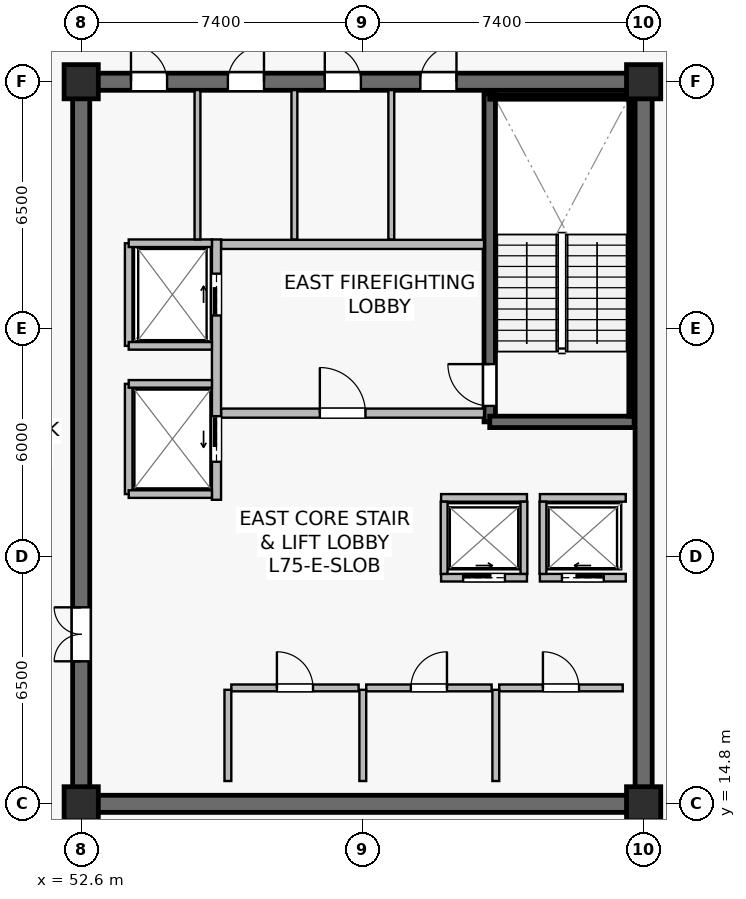
"""IFC4 building model, lengths in metres.
Left out: names, types, materials, properties, quantities, classifications, styles, units other than length and angle.
Written with IfcOpenShell. Run it as: python <this file> out.ifc"""

import sys

from ifc_helpers import new_model, si_unit, direction, frame, frame_2d, origin, origin_2d, place, context, subcontext, project, spatial, rectangle, extrude, source, transform, mapped, element, fill, save


model = new_model("IFC4")
c1 = context("Model", 3, precision=1e-05, world=origin(), true_north=direction((0.0, 1.0)))
c2 = subcontext(c1, "Body", "Model", "MODEL_VIEW")
j1 = project(units=[si_unit("LENGTHUNIT", "METRE"), si_unit("PLANEANGLEUNIT", "RADIAN")], contexts=[c1])
p1 = place(None, origin())
s1 = spatial("IfcSite", under=j1, at=p1, CompositionType="ELEMENT")
p2 = place(p1, origin())
s2 = spatial("IfcBuilding", under=s1, at=p2, CompositionType="ELEMENT")
p3 = place(p2, frame((0.0, 0.0, 314.4)))
s3 = spatial("IfcBuildingStorey", under=s2, at=p3, CompositionType="ELEMENT", Elevation=314.4)
p4 = place(p3, frame((52.375, 14.8, 0.0), z_axis=(0.0, 0.0, 1.0), x_axis=(1.0, 0.0, 0.0)))
e1 = element("IfcWall", 1, at=p4, inside=s3, PredefinedType="SHEAR", context=c2, shape_type="SweptSolid", body=[
    extrude(rectangle(XDim=15.25, YDim=0.45, at=frame_2d((7.625, 0.0))), origin(), (0.0, 0.0, 1.0), 3.9),
])
p5 = place(p3, frame((52.375, 33.8, 0.0), z_axis=(0.0, 0.0, 1.0), x_axis=(1.0, 0.0, 0.0)))
e2 = element("IfcWall", 2, at=p5, inside=s3, PredefinedType="SHEAR", context=c2, shape_type="SweptSolid", body=[
    extrude(rectangle(XDim=15.25, YDim=0.45, at=frame_2d((7.625, 0.0))), origin(), (0.0, 0.0, 1.0), 3.9),
])
p6 = place(p5, frame((9.15, 0.0, 0.0)))
e3 = element("IfcOpeningElement", 3, at=p6, cuts=e2, PredefinedType="OPENING", context=c2, shape_type="SweptSolid", body=[
    extrude(rectangle(XDim=0.95, YDim=2.15, at=frame_2d((0.475, 1.075))), frame((0.0, 0.235, 0.0), z_axis=(0.0, -1.0, 0.0), x_axis=(1.0, 0.0, 0.0)), (0.0, 0.0, 1.0), 0.47),
])
p7 = place(p5, frame((6.635, 0.0, 0.0)))
e4 = element("IfcOpeningElement", 4, at=p7, cuts=e2, PredefinedType="OPENING", context=c2, shape_type="SweptSolid", body=[
    extrude(rectangle(XDim=0.95, YDim=2.15, at=frame_2d((0.475, 1.075))), frame((0.0, 0.235, 0.0), z_axis=(0.0, -1.0, 0.0), x_axis=(1.0, 0.0, 0.0)), (0.0, 0.0, 1.0), 0.47),
])
p8 = place(p5, frame((4.085, 0.0, 0.0)))
e5 = element("IfcOpeningElement", 5, at=p8, cuts=e2, PredefinedType="OPENING", context=c2, shape_type="SweptSolid", body=[
    extrude(rectangle(XDim=0.95, YDim=2.15, at=frame_2d((0.475, 1.075))), frame((0.0, 0.235, 0.0), z_axis=(0.0, -1.0, 0.0), x_axis=(1.0, 0.0, 0.0)), (0.0, 0.0, 1.0), 0.47),
])
p9 = place(p5, frame((1.535, 0.0, 0.0)))
e6 = element("IfcOpeningElement", 6, at=p9, cuts=e2, PredefinedType="OPENING", context=c2, shape_type="SweptSolid", body=[
    extrude(rectangle(XDim=0.95, YDim=2.15, at=frame_2d((0.475, 1.075))), frame((0.0, 0.235, 0.0), z_axis=(0.0, -1.0, 0.0), x_axis=(1.0, 0.0, 0.0)), (0.0, 0.0, 1.0), 0.47),
])
p10 = place(p3, frame((52.6, 15.025, 0.0), z_axis=(0.0, 0.0, 1.0), x_axis=(0.0, 1.0, 0.0)))
e7 = element("IfcWall", 7, at=p10, inside=s3, PredefinedType="SHEAR", context=c2, shape_type="SweptSolid", body=[
    extrude(rectangle(XDim=18.55, YDim=0.45, at=frame_2d((9.275, 0.0))), origin(), (0.0, 0.0, 1.0), 3.9),
])
p11 = place(p10, frame((3.525, 0.0, 0.0)))
e8 = element("IfcOpeningElement", 8, at=p11, cuts=e7, PredefinedType="OPENING", context=c2, shape_type="SweptSolid", body=[
    extrude(rectangle(XDim=1.42, YDim=2.2, at=frame_2d((0.71, 1.1))), frame((0.0, 0.235, 0.0), z_axis=(0.0, -1.0, 0.0), x_axis=(1.0, 0.0, 0.0)), (0.0, 0.0, 1.0), 0.47),
])
p12 = place(p3, frame((67.4, 15.025, 0.0), z_axis=(0.0, 0.0, 1.0), x_axis=(0.0, 1.0, 0.0)))
e9 = element("IfcWall", 9, at=p12, inside=s3, PredefinedType="SHEAR", context=c2, shape_type="SweptSolid", body=[
    extrude(rectangle(XDim=18.55, YDim=0.45, at=frame_2d((9.275, 0.0))), origin(), (0.0, 0.0, 1.0), 3.9),
])
p13 = place(p3, frame((63.35, 24.85, 0.0), z_axis=(0.0, 0.0, 1.0), x_axis=(0.0, 1.0, 0.0)))
e10 = element("IfcWall", 10, at=p13, inside=s3, PredefinedType="SHEAR", context=c2, shape_type="SweptSolid", body=[
    extrude(rectangle(XDim=8.63, YDim=0.3, at=frame_2d((4.315, 0.0))), origin(), (0.0, 0.0, 1.0), 3.9),
])
p14 = place(p13, frame((0.42, 0.0, 0.0)))
e11 = element("IfcOpeningElement", 11, at=p14, cuts=e10, PredefinedType="OPENING", context=c2, shape_type="SweptSolid", body=[
    extrude(rectangle(XDim=1.1, YDim=2.15, at=frame_2d((0.55, 1.075))), frame((0.0, 0.16, 0.0), z_axis=(0.0, -1.0, 0.0), x_axis=(1.0, 0.0, 0.0)), (0.0, 0.0, 1.0), 0.32),
])
p15 = place(p3, frame((63.35, 24.85, 0.0), z_axis=(0.0, 0.0, 1.0), x_axis=(1.0, 0.0, 0.0)))
e12 = element("IfcWall", 12, at=p15, inside=s3, PredefinedType="SHEAR", context=c2, shape_type="SweptSolid", body=[
    extrude(rectangle(XDim=3.8, YDim=0.3, at=frame_2d((1.9, 0.0))), origin(), (0.0, 0.0, 1.0), 3.9),
])
p16 = place(p3, frame((63.35, 33.4, 0.0), z_axis=(0.0, 0.0, 1.0), x_axis=(1.0, 0.0, 0.0)))
e13 = element("IfcWall", 13, at=p16, inside=s3, PredefinedType="SOLIDWALL", context=c2, shape_type="SweptSolid", body=[
    extrude(rectangle(XDim=3.72, YDim=0.12, at=frame_2d((1.86, 0.0))), origin(), (0.0, 0.0, 1.0), 3.9),
])
p17 = place(p3, frame((67.07, 25.0, 0.0), z_axis=(0.0, 0.0, 1.0), x_axis=(0.0, 1.0, 0.0)))
e14 = element("IfcWall", 14, at=p17, inside=s3, PredefinedType="SOLIDWALL", context=c2, shape_type="SweptSolid", body=[
    extrude(rectangle(XDim=8.32, YDim=0.12, at=frame_2d((4.16, 0.0))), origin(), (0.0, 0.0, 1.0), 3.9),
])
m1 = source(origin(), c2, "Body", "SweptSolid", [
    extrude(rectangle(XDim=0.9, YDim=0.9, at=origin_2d()), origin(), (0.0, 0.0, 1.0), 4.2),
])
for number, where, z_axis, x_axis in (
    (15, (52.6, 14.8, 0.0), (0.0, 0.0, 1.0), (1.0, 0.0, 0.0)),
    (16, (67.4, 14.8, 0.0), (0.0, 0.0, 1.0), (1.0, 0.0, 0.0)),
    (17, (52.6, 33.8, 0.0), (0.0, 0.0, 1.0), (1.0, 0.0, 0.0)),
    (18, (67.4, 33.8, 0.0), (0.0, 0.0, 1.0), (1.0, 0.0, 0.0)),
):
    element("IfcColumn", number, at=place(p3, frame(where, z_axis=z_axis, x_axis=x_axis)), inside=s3, PredefinedType="COLUMN", context=c2, shape_type="MappedRepresentation", body=[
        mapped(m1, transform((0.0, 0.0, 0.0), scale=1.0)),
    ])
p18 = place(p3, frame((56.28, 25.08, 0.0), z_axis=(0.0, 0.0, 1.0), x_axis=(1.0, 0.0, 0.0)))
e19 = element("IfcWall", 19, at=p18, inside=s3, PredefinedType="SOLIDWALL", context=c2, shape_type="SweptSolid", body=[
    extrude(rectangle(XDim=6.92, YDim=0.24, at=frame_2d((3.46, 0.0))), origin(), (0.0, 0.0, 1.0), 3.297),
])
p19 = place(p18, frame((2.6, 0.0, 0.0)))
e20 = element("IfcOpeningElement", 20, at=p19, cuts=e19, PredefinedType="OPENING", context=c2, shape_type="SweptSolid", body=[
    extrude(rectangle(XDim=1.2, YDim=2.16, at=frame_2d((0.6, 1.08))), frame((0.0, 0.13, 0.0), z_axis=(0.0, -1.0, 0.0), x_axis=(1.0, 0.0, 0.0)), (0.0, 0.0, 1.0), 0.26),
])
p20 = place(p3, frame((56.28, 29.52, 0.0), z_axis=(0.0, 0.0, 1.0), x_axis=(1.0, 0.0, 0.0)))
e21 = element("IfcWall", 21, at=p20, inside=s3, PredefinedType="SOLIDWALL", context=c2, shape_type="SweptSolid", body=[
    extrude(rectangle(XDim=6.92, YDim=0.24, at=frame_2d((3.46, 0.0))), origin(), (0.0, 0.0, 1.0), 3.297),
])
p21 = place(p3, frame((56.16, 22.8, 0.0), z_axis=(0.0, 0.0, 1.0), x_axis=(0.0, 1.0, 0.0)))
e22 = element("IfcWall", 22, at=p21, inside=s3, PredefinedType="SOLIDWALL", context=c2, shape_type="SweptSolid", body=[
    extrude(rectangle(XDim=6.85, YDim=0.24, at=frame_2d((3.425, 0.0))), origin(), (0.0, 0.0, 1.0), 3.035),
])
p22 = place(p21, frame((4.85, 0.0, 0.0)))
e23 = element("IfcOpeningElement", 23, at=p22, cuts=e22, PredefinedType="OPENING", context=c2, shape_type="SweptSolid", body=[
    extrude(rectangle(XDim=1.1, YDim=2.22, at=frame_2d((0.55, 1.11))), frame((0.0, 0.13, 0.0), z_axis=(0.0, -1.0, 0.0), x_axis=(1.0, 0.0, 0.0)), (0.0, 0.0, 1.0), 0.26),
])
p23 = place(p21, frame((1.0, 0.0, 0.0)))
e24 = element("IfcOpeningElement", 24, at=p23, cuts=e22, PredefinedType="OPENING", context=c2, shape_type="SweptSolid", body=[
    extrude(rectangle(XDim=1.2, YDim=2.22, at=frame_2d((0.6, 1.11))), frame((0.0, 0.13, 0.0), z_axis=(0.0, -1.0, 0.0), x_axis=(1.0, 0.0, 0.0)), (0.0, 0.0, 1.0), 0.26),
])
p24 = place(p3, frame((64.67, 20.75, 0.0), z_axis=(0.0, 0.0, 1.0), x_axis=(1.0, 0.0, 0.0)))
e25 = element("IfcWall", 25, at=p24, inside=s3, PredefinedType="SOLIDWALL", context=c2, shape_type="SweptSolid", body=[
    extrude(rectangle(XDim=2.26, YDim=0.2, at=frame_2d((1.13, 0.0))), origin(), (0.0, 0.0, 1.0), 3.9),
])
p25 = place(p24, frame((0.58, 0.0, 0.0)))
e26 = element("IfcOpeningElement", 26, at=p25, cuts=e25, PredefinedType="OPENING", context=c2, shape_type="SweptSolid", body=[
    extrude(rectangle(XDim=1.1, YDim=2.22, at=frame_2d((0.55, 1.11))), frame((0.0, 0.11, 0.0), z_axis=(0.0, -1.0, 0.0), x_axis=(1.0, 0.0, 0.0)), (0.0, 0.0, 1.0), 0.22),
])
p26 = place(p3, frame((64.67, 22.85, 0.0), z_axis=(0.0, 0.0, 1.0), x_axis=(1.0, 0.0, 0.0)))
e27 = element("IfcWall", 27, at=p26, inside=s3, PredefinedType="SOLIDWALL", context=c2, shape_type="SweptSolid", body=[
    extrude(rectangle(XDim=2.26, YDim=0.2, at=frame_2d((1.13, 0.0))), origin(), (0.0, 0.0, 1.0), 3.9),
])
p27 = place(p3, frame((64.75, 20.85, 0.0), z_axis=(0.0, 0.0, 1.0), x_axis=(0.0, 1.0, 0.0)))
e28 = element("IfcWall", 28, at=p27, inside=s3, PredefinedType="SOLIDWALL", context=c2, shape_type="SweptSolid", body=[
    extrude(rectangle(XDim=1.9, YDim=0.18, at=frame_2d((0.95, 0.0))), origin(), (0.0, 0.0, 1.0), 3.9),
])
p28 = place(p3, frame((62.07, 20.75, 0.0), z_axis=(0.0, 0.0, 1.0), x_axis=(1.0, 0.0, 0.0)))
e29 = element("IfcWall", 29, at=p28, inside=s3, PredefinedType="SOLIDWALL", context=c2, shape_type="SweptSolid", body=[
    extrude(rectangle(XDim=2.26, YDim=0.2, at=frame_2d((1.13, 0.0))), origin(), (0.0, 0.0, 1.0), 3.9),
])
p29 = place(p28, frame((0.58, 0.0, 0.0)))
e30 = element("IfcOpeningElement", 30, at=p29, cuts=e29, PredefinedType="OPENING", context=c2, shape_type="SweptSolid", body=[
    extrude(rectangle(XDim=1.1, YDim=2.22, at=frame_2d((0.55, 1.11))), frame((0.0, 0.11, 0.0), z_axis=(0.0, -1.0, 0.0), x_axis=(1.0, 0.0, 0.0)), (0.0, 0.0, 1.0), 0.22),
])
p30 = place(p3, frame((62.07, 22.85, 0.0), z_axis=(0.0, 0.0, 1.0), x_axis=(1.0, 0.0, 0.0)))
e31 = element("IfcWall", 31, at=p30, inside=s3, PredefinedType="SOLIDWALL", context=c2, shape_type="SweptSolid", body=[
    extrude(rectangle(XDim=2.26, YDim=0.2, at=frame_2d((1.13, 0.0))), origin(), (0.0, 0.0, 1.0), 3.9),
])
for number, where, z_axis, x_axis in (
    (32, (62.15, 20.85, 0.0), (0.0, 0.0, 1.0), (0.0, 1.0, 0.0)),
    (33, (64.25, 20.85, 0.0), (0.0, 0.0, 1.0), (0.0, 1.0, 0.0)),
):
    element("IfcWall", number, at=place(p3, frame(where, z_axis=z_axis, x_axis=x_axis)), inside=s3, PredefinedType="SOLIDWALL", context=c2, shape_type="SweptSolid", body=[
        extrude(rectangle(XDim=1.9, YDim=0.18, at=frame_2d((0.95, 0.0))), origin(), (0.0, 0.0, 1.0), 3.9),
    ])
p31 = place(p3, frame((53.85, 26.85, 0.0), z_axis=(0.0, 0.0, 1.0), x_axis=(0.0, 1.0, 0.0)))
e34 = element("IfcWall", 34, at=p31, inside=s3, PredefinedType="SOLIDWALL", context=c2, shape_type="SweptSolid", body=[
    extrude(rectangle(XDim=2.7, YDim=0.2, at=frame_2d((1.35, 0.0))), origin(), (0.0, 0.0, 1.0), 3.9),
])
p32 = place(p3, frame((53.85, 29.55, 0.0), z_axis=(0.0, 0.0, 1.0), x_axis=(1.0, 0.0, 0.0)))
e35 = element("IfcWall", 35, at=p32, inside=s3, PredefinedType="SOLIDWALL", context=c2, shape_type="SweptSolid", body=[
    extrude(rectangle(XDim=2.19, YDim=0.2, at=frame_2d((1.095, 0.0))), origin(), (0.0, 0.0, 1.0), 3.9),
])
p33 = place(p3, frame((53.85, 26.85, 0.0), z_axis=(0.0, 0.0, 1.0), x_axis=(1.0, 0.0, 0.0)))
e36 = element("IfcWall", 36, at=p33, inside=s3, PredefinedType="SOLIDWALL", context=c2, shape_type="SweptSolid", body=[
    extrude(rectangle(XDim=2.19, YDim=0.2, at=frame_2d((1.095, 0.0))), origin(), (0.0, 0.0, 1.0), 3.297),
])
p34 = place(p3, frame((53.85, 22.95, 0.0), z_axis=(0.0, 0.0, 1.0), x_axis=(0.0, 1.0, 0.0)))
e37 = element("IfcWall", 37, at=p34, inside=s3, PredefinedType="SOLIDWALL", context=c2, shape_type="SweptSolid", body=[
    extrude(rectangle(XDim=2.9, YDim=0.2, at=frame_2d((1.45, 0.0))), origin(), (0.0, 0.0, 1.0), 3.035),
])
for number, where, z_axis, x_axis in (
    (38, (53.85, 25.85, 0.0), (0.0, 0.0, 1.0), (1.0, 0.0, 0.0)),
    (39, (53.85, 22.95, 0.0), (0.0, 0.0, 1.0), (1.0, 0.0, 0.0)),
):
    element("IfcWall", number, at=place(p3, frame(where, z_axis=z_axis, x_axis=x_axis)), inside=s3, PredefinedType="SOLIDWALL", context=c2, shape_type="SweptSolid", body=[
        extrude(rectangle(XDim=2.19, YDim=0.2, at=frame_2d((1.095, 0.0))), origin(), (0.0, 0.0, 1.0), 3.9),
    ])
p35 = place(p3, frame((63.6, 17.85, 0.0), z_axis=(0.0, 0.0, 1.0), x_axis=(1.0, 0.0, 0.0)))
e40 = element("IfcWall", 40, at=p35, inside=s3, PredefinedType="SOLIDWALL", context=c2, shape_type="SweptSolid", body=[
    extrude(rectangle(XDim=3.25, YDim=0.18, at=frame_2d((1.625, 0.0))), origin(), (0.0, 0.0, 1.0), 3.9),
])
p36 = place(p35, frame((1.15, 0.0, 0.0)))
e41 = element("IfcOpeningElement", 41, at=p36, cuts=e40, PredefinedType="OPENING", context=c2, shape_type="SweptSolid", body=[
    extrude(rectangle(XDim=0.95, YDim=2.15, at=frame_2d((0.475, 1.075))), frame((0.0, 0.1, 0.0), z_axis=(0.0, -1.0, 0.0), x_axis=(1.0, 0.0, 0.0)), (0.0, 0.0, 1.0), 0.2),
])
p37 = place(p3, frame((63.51, 15.4, 0.0), z_axis=(0.0, 0.0, 1.0), x_axis=(0.0, 1.0, 0.0)))
e42 = element("IfcWall", 42, at=p37, inside=s3, PredefinedType="SOLIDWALL", context=c2, shape_type="SweptSolid", body=[
    extrude(rectangle(XDim=2.4, YDim=0.18, at=frame_2d((1.2, 0.0))), origin(), (0.0, 0.0, 1.0), 3.9),
])
p38 = place(p3, frame((60.1, 17.85, 0.0), z_axis=(0.0, 0.0, 1.0), x_axis=(1.0, 0.0, 0.0)))
e43 = element("IfcWall", 43, at=p38, inside=s3, PredefinedType="SOLIDWALL", context=c2, shape_type="SweptSolid", body=[
    extrude(rectangle(XDim=3.3, YDim=0.18, at=frame_2d((1.65, 0.0))), origin(), (0.0, 0.0, 1.0), 3.297),
])
p39 = place(p38, frame((1.175, 0.0, 0.0)))
e44 = element("IfcOpeningElement", 44, at=p39, cuts=e43, PredefinedType="OPENING", context=c2, shape_type="SweptSolid", body=[
    extrude(rectangle(XDim=0.95, YDim=2.15, at=frame_2d((0.475, 1.075))), frame((0.0, 0.1, 0.0), z_axis=(0.0, -1.0, 0.0), x_axis=(1.0, 0.0, 0.0)), (0.0, 0.0, 1.0), 0.2),
])
p40 = place(p3, frame((60.01, 15.4, 0.0), z_axis=(0.0, 0.0, 1.0), x_axis=(0.0, 1.0, 0.0)))
e45 = element("IfcWall", 45, at=p40, inside=s3, PredefinedType="SOLIDWALL", context=c2, shape_type="SweptSolid", body=[
    extrude(rectangle(XDim=2.4, YDim=0.18, at=frame_2d((1.2, 0.0))), origin(), (0.0, 0.0, 1.0), 3.297),
])
p41 = place(p3, frame((56.55, 17.85, 0.0), z_axis=(0.0, 0.0, 1.0), x_axis=(1.0, 0.0, 0.0)))
e46 = element("IfcWall", 46, at=p41, inside=s3, PredefinedType="SOLIDWALL", context=c2, shape_type="SweptSolid", body=[
    extrude(rectangle(XDim=3.35, YDim=0.18, at=frame_2d((1.675, 0.0))), origin(), (0.0, 0.0, 1.0), 3.297),
])
p42 = place(p41, frame((1.2, 0.0, 0.0)))
e47 = element("IfcOpeningElement", 47, at=p42, cuts=e46, PredefinedType="OPENING", context=c2, shape_type="SweptSolid", body=[
    extrude(rectangle(XDim=0.95, YDim=2.15, at=frame_2d((0.475, 1.075))), frame((0.0, 0.1, 0.0), z_axis=(0.0, -1.0, 0.0), x_axis=(1.0, 0.0, 0.0)), (0.0, 0.0, 1.0), 0.2),
])
p43 = place(p3, frame((56.46, 15.4, 0.0), z_axis=(0.0, 0.0, 1.0), x_axis=(0.0, 1.0, 0.0)))
e48 = element("IfcWall", 48, at=p43, inside=s3, PredefinedType="SOLIDWALL", context=c2, shape_type="SweptSolid", body=[
    extrude(rectangle(XDim=2.4, YDim=0.18, at=frame_2d((1.2, 0.0))), origin(), (0.0, 0.0, 1.0), 3.9),
])
for number, where, z_axis, x_axis in (
    (49, (60.76, 29.65, 0.0), (0.0, 0.0, 1.0), (0.0, 1.0, 0.0)),
    (50, (58.21, 29.65, 0.0), (0.0, 0.0, 1.0), (0.0, 1.0, 0.0)),
    (51, (55.66, 29.65, 0.0), (0.0, 0.0, 1.0), (0.0, 1.0, 0.0)),
):
    element("IfcWall", number, at=place(p3, frame(where, z_axis=z_axis, x_axis=x_axis)), inside=s3, PredefinedType="PLUMBINGWALL", context=c2, shape_type="SweptSolid", body=[
        extrude(rectangle(XDim=3.93, YDim=0.155, at=frame_2d((1.965, 0.0))), origin(), (0.0, 0.0, 1.0), 3.9),
    ])
m2 = source(origin(), c2, "Body", "SweptSolid", [
    extrude(rectangle(XDim=1.1, YDim=2.15, at=frame_2d((0.55, 1.075))), frame((0.0, 0.025, 0.0), z_axis=(0.0, -1.0, 0.0), x_axis=(1.0, 0.0, 0.0)), (0.0, 0.0, 1.0), 0.05),
])
p44 = place(p14, origin())
e52 = element("IfcDoor", 52, at=p44, inside=s3, OperationType="SINGLE_SWING_RIGHT", PredefinedType="DOOR", context=c2, shape_type="MappedRepresentation", body=[
    mapped(m2, transform((0.0, 0.0, 0.0), scale=1.0)),
])
fill(e11, e52)
m3 = source(origin(), c2, "Body", "SweptSolid", [
    extrude(rectangle(XDim=1.2, YDim=2.16, at=frame_2d((0.6, 1.08))), frame((0.0, 0.025, 0.0), z_axis=(0.0, -1.0, 0.0), x_axis=(1.0, 0.0, 0.0)), (0.0, 0.0, 1.0), 0.05),
])
p45 = place(p19, origin())
e53 = element("IfcDoor", 53, at=p45, inside=s3, OperationType="SINGLE_SWING_LEFT", PredefinedType="DOOR", context=c2, shape_type="MappedRepresentation", body=[
    mapped(m3, transform((0.0, 0.0, 0.0), scale=1.0)),
])
fill(e20, e53)
m4 = source(origin(), c2, "Body", "SweptSolid", [
    extrude(rectangle(XDim=1.1, YDim=2.22, at=frame_2d((0.55, 1.11))), frame((0.0, 0.025, 0.0), z_axis=(0.0, -1.0, 0.0), x_axis=(1.0, 0.0, 0.0)), (0.0, 0.0, 1.0), 0.05),
])
p46 = place(p25, origin())
e54 = element("IfcDoor", 54, at=p46, inside=s3, OperationType="SLIDING_TO_LEFT", PredefinedType="USERDEFINED", context=c2, shape_type="MappedRepresentation", body=[
    mapped(m4, transform((0.0, 0.0, 0.0), scale=1.0)),
])
fill(e26, e54)
p47 = place(p29, origin())
e55 = element("IfcDoor", 55, at=p47, inside=s3, OperationType="SLIDING_TO_RIGHT", PredefinedType="USERDEFINED", context=c2, shape_type="MappedRepresentation", body=[
    mapped(m4, transform((0.0, 0.0, 0.0), scale=1.0)),
])
fill(e30, e55)
p48 = place(p22, origin())
e56 = element("IfcDoor", 56, at=p48, inside=s3, OperationType="SLIDING_TO_RIGHT", PredefinedType="USERDEFINED", context=c2, shape_type="MappedRepresentation", body=[
    mapped(m4, transform((0.0, 0.0, 0.0), scale=1.0)),
])
fill(e23, e56)
m5 = source(origin(), c2, "Body", "SweptSolid", [
    extrude(rectangle(XDim=1.2, YDim=2.22, at=frame_2d((0.6, 1.11))), frame((0.0, 0.025, 0.0), z_axis=(0.0, -1.0, 0.0), x_axis=(1.0, 0.0, 0.0)), (0.0, 0.0, 1.0), 0.05),
])
p49 = place(p23, origin())
e57 = element("IfcDoor", 57, at=p49, inside=s3, OperationType="SLIDING_TO_LEFT", PredefinedType="USERDEFINED", context=c2, shape_type="MappedRepresentation", body=[
    mapped(m5, transform((0.0, 0.0, 0.0), scale=1.0)),
])
fill(e24, e57)
m6 = source(origin(), c2, "Body", "SweptSolid", [
    extrude(rectangle(XDim=0.95, YDim=2.15, at=frame_2d((0.475, 1.075))), frame((0.0, 0.025, 0.0), z_axis=(0.0, -1.0, 0.0), x_axis=(1.0, 0.0, 0.0)), (0.0, 0.0, 1.0), 0.05),
])
p50 = place(p36, origin())
e58 = element("IfcDoor", 58, at=p50, inside=s3, OperationType="SINGLE_SWING_LEFT", PredefinedType="DOOR", context=c2, shape_type="MappedRepresentation", body=[
    mapped(m6, transform((0.0, 0.0, 0.0), scale=1.0)),
])
fill(e41, e58)
p51 = place(p39, origin())
e59 = element("IfcDoor", 59, at=p51, inside=s3, OperationType="SINGLE_SWING_RIGHT", PredefinedType="DOOR", context=c2, shape_type="MappedRepresentation", body=[
    mapped(m6, transform((0.0, 0.0, 0.0), scale=1.0)),
])
fill(e44, e59)
p52 = place(p42, origin())
e60 = element("IfcDoor", 60, at=p52, inside=s3, OperationType="SINGLE_SWING_LEFT", PredefinedType="DOOR", context=c2, shape_type="MappedRepresentation", body=[
    mapped(m6, transform((0.0, 0.0, 0.0), scale=1.0)),
])
fill(e47, e60)
m7 = source(origin(), c2, "Body", "SweptSolid", [
    extrude(rectangle(XDim=1.42, YDim=2.2, at=frame_2d((0.71, 1.1))), frame((0.0, 0.025, 0.0), z_axis=(0.0, -1.0, 0.0), x_axis=(1.0, 0.0, 0.0)), (0.0, 0.0, 1.0), 0.05),
])
p53 = place(p11, origin())
e61 = element("IfcDoor", 61, at=p53, inside=s3, OperationType="DOUBLE_DOOR_SINGLE_SWING", PredefinedType="DOOR", context=c2, shape_type="MappedRepresentation", body=[
    mapped(m7, transform((0.0, 0.0, 0.0), scale=1.0)),
])
fill(e8, e61)
p54 = place(p6, origin())
e62 = element("IfcDoor", 62, at=p54, inside=s3, OperationType="SINGLE_SWING_RIGHT", PredefinedType="DOOR", context=c2, shape_type="MappedRepresentation", body=[
    mapped(m6, transform((0.0, 0.0, 0.0), scale=1.0)),
])
fill(e3, e62)
p55 = place(p7, origin())
e63 = element("IfcDoor", 63, at=p55, inside=s3, OperationType="SINGLE_SWING_LEFT", PredefinedType="DOOR", context=c2, shape_type="MappedRepresentation", body=[
    mapped(m6, transform((0.0, 0.0, 0.0), scale=1.0)),
])
fill(e4, e63)
p56 = place(p8, origin())
e64 = element("IfcDoor", 64, at=p56, inside=s3, OperationType="SINGLE_SWING_RIGHT", PredefinedType="DOOR", context=c2, shape_type="MappedRepresentation", body=[
    mapped(m6, transform((0.0, 0.0, 0.0), scale=1.0)),
])
fill(e5, e64)
p57 = place(p9, origin())
e65 = element("IfcDoor", 65, at=p57, inside=s3, OperationType="SINGLE_SWING_LEFT", PredefinedType="DOOR", context=c2, shape_type="MappedRepresentation", body=[
    mapped(m6, transform((0.0, 0.0, 0.0), scale=1.0)),
])
fill(e6, e65)
save(model, sys.argv[1])
